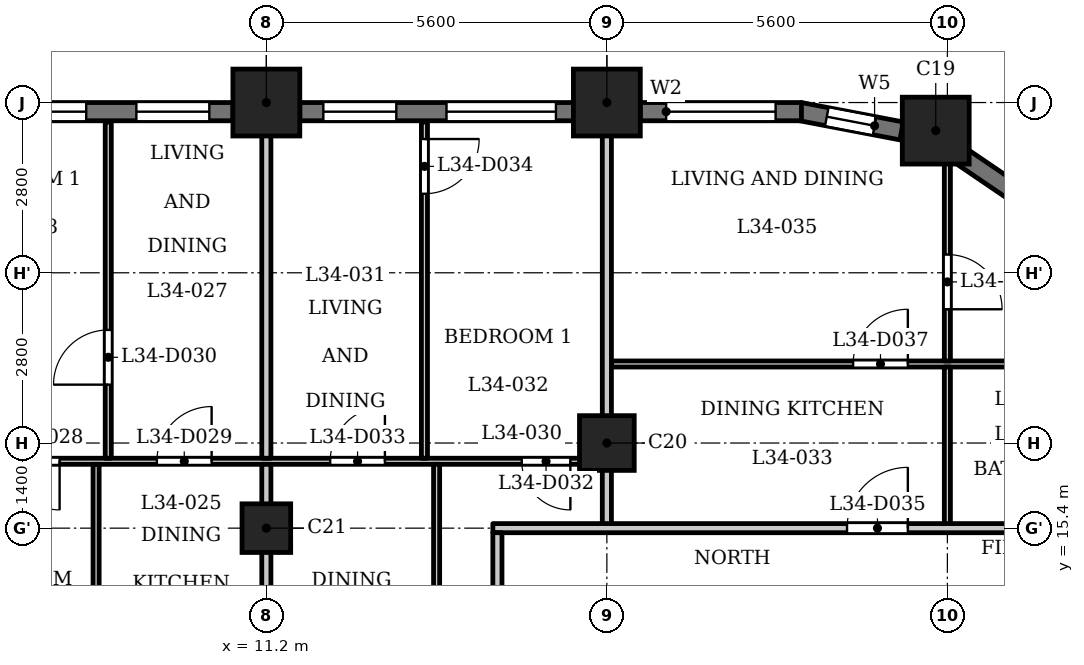
"""IFC4 building model, lengths in metres.
Left out: names, types, materials, properties, quantities, classifications, styles, units other than length and angle.
Written with IfcOpenShell. Run it as: python <this file> out.ifc"""

import sys

from ifc_helpers import new_model, si_unit, direction, frame, frame_2d, origin, origin_2d, place, context, subcontext, project, spatial, rectangle, extrude, element, fill, save


model = new_model("IFC4")
c1 = context("Model", 3, precision=1e-05, world=origin(), true_north=direction((0.0, 1.0)))
c2 = subcontext(c1, "Body", "Model", "MODEL_VIEW")
j1 = project(units=[si_unit("LENGTHUNIT", "METRE"), si_unit("PLANEANGLEUNIT", "RADIAN")], contexts=[c1])
p1 = place(None, origin())
s1 = spatial("IfcSite", under=j1, at=p1, CompositionType="ELEMENT")
p2 = place(p1, origin())
s2 = spatial("IfcBuilding", under=s1, at=p2, CompositionType="ELEMENT")
p3 = place(p2, frame((0.0, 0.0, 136.1)))
s3 = spatial("IfcBuildingStorey", under=s2, at=p3, CompositionType="ELEMENT", Elevation=136.1)
for number, where, z_axis, x_axis in (
    (1, (22.209, 21.938, 0.0), (0.0, 0.0, 1.0), (1.0, 0.0, 0.0)),
    (2, (16.8, 22.4, 0.0), (0.0, 0.0, 1.0), (1.0, 0.0, 0.0)),
    (3, (11.2, 22.4, 0.0), (0.0, 0.0, 1.0), (1.0, 0.0, 0.0)),
):
    element("IfcColumn", number, at=place(p3, frame(where, z_axis=z_axis, x_axis=x_axis)), inside=s3, PredefinedType="COLUMN", context=c2, shape_type="SweptSolid", body=[
        extrude(rectangle(XDim=1.1, YDim=1.1, at=origin_2d()), origin(), (0.0, 0.0, 1.0), 3.5),
    ])
p4 = place(p3, frame((16.8, 16.8, 0.0), z_axis=(0.0, 0.0, 1.0), x_axis=(1.0, 0.0, 0.0)))
e4 = element("IfcColumn", 4, at=p4, inside=s3, PredefinedType="COLUMN", context=c2, shape_type="SweptSolid", body=[
    extrude(rectangle(XDim=0.9, YDim=0.9, at=origin_2d()), origin(), (0.0, 0.0, 1.0), 3.5),
])
p5 = place(p3, frame((11.2, 15.4, 0.0), z_axis=(0.0, 0.0, 1.0), x_axis=(1.0, 0.0, 0.0)))
e5 = element("IfcColumn", 5, at=p5, inside=s3, PredefinedType="COLUMN", context=c2, shape_type="SweptSolid", body=[
    extrude(rectangle(XDim=0.8, YDim=0.8, at=origin_2d()), origin(), (0.0, 0.0, 1.0), 3.5),
])
p6 = place(p3, frame((23.492, 20.932, 0.0), z_axis=(0.0, 0.0, 1.0), x_axis=(-0.826993959827, 0.562210806023, 0.0)))
e6 = element("IfcWall", 6, at=p6, inside=s3, PredefinedType="SOLIDWALL", context=c2, shape_type="SweptSolid", body=[
    extrude(rectangle(XDim=1.077, YDim=0.3, at=frame_2d((0.539, 0.0))), origin(), (0.0, 0.0, 1.0), 3.2),
])
p7 = place(p3, frame((21.648, 21.933, 0.0), z_axis=(0.0, 0.0, 1.0), x_axis=(-0.982297206936, 0.187329114784, 0.0)))
e7 = element("IfcWall", 7, at=p7, inside=s3, PredefinedType="SOLIDWALL", context=c2, shape_type="SweptSolid", body=[
    extrude(rectangle(XDim=1.706, YDim=0.3, at=frame_2d((0.853, 0.0))), origin(), (0.0, 0.0, 1.0), 2.45),
])
p8 = place(p7, frame((0.453, 0.0, 0.6)))
e8 = element("IfcOpeningElement", 8, at=p8, cuts=e7, PredefinedType="OPENING", context=c2, shape_type="SweptSolid", body=[
    extrude(rectangle(XDim=0.8, YDim=1.55, at=frame_2d((0.4, 0.775))), frame((0.0, 0.16, 0.0), z_axis=(0.0, -1.0, 0.0), x_axis=(1.0, 0.0, 0.0)), (0.0, 0.0, 1.0), 0.32),
])
p9 = place(p3, frame((20.0, 22.25, 0.0), z_axis=(0.0, 0.0, 1.0), x_axis=(-1.0, 0.0, 0.0)))
e9 = element("IfcWall", 9, at=p9, inside=s3, PredefinedType="SOLIDWALL", context=c2, shape_type="SweptSolid", body=[
    extrude(rectangle(XDim=2.65, YDim=0.3, at=frame_2d((1.325, 0.0))), origin(), (0.0, 0.0, 1.0), 2.45),
])
p10 = place(p9, frame((0.425, 0.0, 0.9)))
e10 = element("IfcOpeningElement", 10, at=p10, cuts=e9, PredefinedType="OPENING", context=c2, shape_type="SweptSolid", body=[
    extrude(rectangle(XDim=1.8, YDim=1.25, at=frame_2d((0.9, 0.625))), frame((0.0, 0.16, 0.0), z_axis=(0.0, -1.0, 0.0), x_axis=(1.0, 0.0, 0.0)), (0.0, 0.0, 1.0), 0.32),
])
p11 = place(p3, frame((16.25, 22.25, 0.0), z_axis=(0.0, 0.0, 1.0), x_axis=(-1.0, 0.0, 0.0)))
e11 = element("IfcWall", 11, at=p11, inside=s3, PredefinedType="SOLIDWALL", context=c2, shape_type="SweptSolid", body=[
    extrude(rectangle(XDim=4.5, YDim=0.3, at=frame_2d((2.25, 0.0))), origin(), (0.0, 0.0, 1.0), 2.45),
])
p12 = place(p11, frame((0.288, 0.0, 0.9)))
e12 = element("IfcOpeningElement", 12, at=p12, cuts=e11, PredefinedType="OPENING", context=c2, shape_type="SweptSolid", body=[
    extrude(rectangle(XDim=1.8, YDim=1.25, at=frame_2d((0.9, 0.625))), frame((0.0, 0.16, 0.0), z_axis=(0.0, -1.0, 0.0), x_axis=(1.0, 0.0, 0.0)), (0.0, 0.0, 1.0), 0.32),
])
p13 = place(p11, frame((2.913, 0.0, 0.6)))
e13 = element("IfcOpeningElement", 13, at=p13, cuts=e11, PredefinedType="OPENING", context=c2, shape_type="SweptSolid", body=[
    extrude(rectangle(XDim=1.2, YDim=1.55, at=frame_2d((0.6, 0.775))), frame((0.0, 0.16, 0.0), z_axis=(0.0, -1.0, 0.0), x_axis=(1.0, 0.0, 0.0)), (0.0, 0.0, 1.0), 0.32),
])
p14 = place(p3, frame((10.65, 22.25, 0.0), z_axis=(0.0, 0.0, 1.0), x_axis=(-1.0, 0.0, 0.0)))
e14 = element("IfcWall", 14, at=p14, inside=s3, PredefinedType="SOLIDWALL", context=c2, shape_type="SweptSolid", body=[
    extrude(rectangle(XDim=4.5, YDim=0.3, at=frame_2d((2.25, 0.0))), origin(), (0.0, 0.0, 1.0), 2.45),
])
p15 = place(p14, frame((0.387, 0.0, 0.6)))
e15 = element("IfcOpeningElement", 15, at=p15, cuts=e14, PredefinedType="OPENING", context=c2, shape_type="SweptSolid", body=[
    extrude(rectangle(XDim=1.2, YDim=1.55, at=frame_2d((0.6, 0.775))), frame((0.0, 0.16, 0.0), z_axis=(0.0, -1.0, 0.0), x_axis=(1.0, 0.0, 0.0)), (0.0, 0.0, 1.0), 0.32),
])
p16 = place(p14, frame((2.413, 0.0, 0.9)))
e16 = element("IfcOpeningElement", 16, at=p16, cuts=e14, PredefinedType="OPENING", context=c2, shape_type="SweptSolid", body=[
    extrude(rectangle(XDim=1.8, YDim=1.25, at=frame_2d((0.9, 0.625))), frame((0.0, 0.16, 0.0), z_axis=(0.0, -1.0, 0.0), x_axis=(1.0, 0.0, 0.0)), (0.0, 0.0, 1.0), 0.32),
])
p17 = place(p3, frame((14.925, 15.4, 0.0), z_axis=(0.0, 0.0, 1.0), x_axis=(1.0, 0.0, 0.0)))
e17 = element("IfcWall", 17, at=p17, inside=s3, PredefinedType="PARTITIONING", context=c2, shape_type="SweptSolid", body=[
    extrude(rectangle(XDim=12.559, YDim=0.15, at=frame_2d((6.279, 0.0))), origin(), (0.0, 0.0, 1.0), 3.2),
])
p18 = place(p17, frame((5.825, 0.0, 0.0)))
e18 = element("IfcOpeningElement", 18, at=p18, cuts=e17, PredefinedType="OPENING", context=c2, shape_type="SweptSolid", body=[
    extrude(rectangle(XDim=1.0, YDim=2.1, at=frame_2d((0.5, 1.05))), frame((0.0, 0.085, 0.0), z_axis=(0.0, -1.0, 0.0), x_axis=(1.0, 0.0, 0.0)), (0.0, 0.0, 1.0), 0.17),
])
p19 = place(p3, frame((-16.725, 16.5, 0.0), z_axis=(0.0, 0.0, 1.0), x_axis=(1.0, 0.0, 0.0)))
e19 = element("IfcWall", 19, at=p19, inside=s3, PredefinedType="PARTITIONING", context=c2, shape_type="SweptSolid", body=[
    extrude(rectangle(XDim=33.45, YDim=0.1, at=frame_2d((16.725, 0.0))), origin(), (0.0, 0.0, 1.0), 3.2),
])
p20 = place(p19, frame((9.675, 0.0, 0.0)))
e20 = element("IfcOpeningElement", 20, at=p20, cuts=e19, PredefinedType="OPENING", context=c2, shape_type="SweptSolid", body=[
    extrude(rectangle(XDim=0.8, YDim=2.1, at=frame_2d((0.4, 1.05))), frame((0.0, 0.06, 0.0), z_axis=(0.0, -1.0, 0.0), x_axis=(1.0, 0.0, 0.0)), (0.0, 0.0, 1.0), 0.12),
])
p21 = place(p19, frame((3.975, 0.0, 0.0)))
e21 = element("IfcOpeningElement", 21, at=p21, cuts=e19, PredefinedType="OPENING", context=c2, shape_type="SweptSolid", body=[
    extrude(rectangle(XDim=0.9, YDim=2.1, at=frame_2d((0.45, 1.05))), frame((0.0, 0.06, 0.0), z_axis=(0.0, -1.0, 0.0), x_axis=(1.0, 0.0, 0.0)), (0.0, 0.0, 1.0), 0.12),
])
p22 = place(p19, frame((12.025, 0.0, 0.0)))
e22 = element("IfcOpeningElement", 22, at=p22, cuts=e19, PredefinedType="OPENING", context=c2, shape_type="SweptSolid", body=[
    extrude(rectangle(XDim=0.8, YDim=2.1, at=frame_2d((0.4, 1.05))), frame((0.0, 0.06, 0.0), z_axis=(0.0, -1.0, 0.0), x_axis=(1.0, 0.0, 0.0)), (0.0, 0.0, 1.0), 0.12),
])
p23 = place(p19, frame((15.175, 0.0, 0.0)))
e23 = element("IfcOpeningElement", 23, at=p23, cuts=e19, PredefinedType="OPENING", context=c2, shape_type="SweptSolid", body=[
    extrude(rectangle(XDim=0.9, YDim=2.1, at=frame_2d((0.45, 1.05))), frame((0.0, 0.06, 0.0), z_axis=(0.0, -1.0, 0.0), x_axis=(1.0, 0.0, 0.0)), (0.0, 0.0, 1.0), 0.12),
])
p24 = place(p19, frame((20.975, 0.0, 0.0)))
e24 = element("IfcOpeningElement", 24, at=p24, cuts=e19, PredefinedType="OPENING", context=c2, shape_type="SweptSolid", body=[
    extrude(rectangle(XDim=0.8, YDim=2.1, at=frame_2d((0.4, 1.05))), frame((0.0, 0.06, 0.0), z_axis=(0.0, -1.0, 0.0), x_axis=(1.0, 0.0, 0.0)), (0.0, 0.0, 1.0), 0.12),
])
p25 = place(p19, frame((18.175, 0.0, 0.0)))
e25 = element("IfcOpeningElement", 25, at=p25, cuts=e19, PredefinedType="OPENING", context=c2, shape_type="SweptSolid", body=[
    extrude(rectangle(XDim=0.9, YDim=2.1, at=frame_2d((0.45, 1.05))), frame((0.0, 0.06, 0.0), z_axis=(0.0, -1.0, 0.0), x_axis=(1.0, 0.0, 0.0)), (0.0, 0.0, 1.0), 0.12),
])
p26 = place(p19, frame((23.725, 0.0, 0.0)))
e26 = element("IfcOpeningElement", 26, at=p26, cuts=e19, PredefinedType="OPENING", context=c2, shape_type="SweptSolid", body=[
    extrude(rectangle(XDim=0.8, YDim=2.1, at=frame_2d((0.4, 1.05))), frame((0.0, 0.06, 0.0), z_axis=(0.0, -1.0, 0.0), x_axis=(1.0, 0.0, 0.0)), (0.0, 0.0, 1.0), 0.12),
])
p27 = place(p19, frame((26.125, 0.0, 0.0)))
e27 = element("IfcOpeningElement", 27, at=p27, cuts=e19, PredefinedType="OPENING", context=c2, shape_type="SweptSolid", body=[
    extrude(rectangle(XDim=0.9, YDim=2.1, at=frame_2d((0.45, 1.05))), frame((0.0, 0.06, 0.0), z_axis=(0.0, -1.0, 0.0), x_axis=(1.0, 0.0, 0.0)), (0.0, 0.0, 1.0), 0.12),
])
p28 = place(p19, frame((32.125, 0.0, 0.0)))
e28 = element("IfcOpeningElement", 28, at=p28, cuts=e19, PredefinedType="OPENING", context=c2, shape_type="SweptSolid", body=[
    extrude(rectangle(XDim=0.8, YDim=2.1, at=frame_2d((0.4, 1.05))), frame((0.0, 0.06, 0.0), z_axis=(0.0, -1.0, 0.0), x_axis=(1.0, 0.0, 0.0)), (0.0, 0.0, 1.0), 0.12),
])
p29 = place(p19, frame((28.975, 0.0, 0.0)))
e29 = element("IfcOpeningElement", 29, at=p29, cuts=e19, PredefinedType="OPENING", context=c2, shape_type="SweptSolid", body=[
    extrude(rectangle(XDim=0.9, YDim=2.1, at=frame_2d((0.45, 1.05))), frame((0.0, 0.06, 0.0), z_axis=(0.0, -1.0, 0.0), x_axis=(1.0, 0.0, 0.0)), (0.0, 0.0, 1.0), 0.12),
])
p30 = place(p3, frame((16.875, 18.1, 0.0), z_axis=(0.0, 0.0, 1.0), x_axis=(1.0, 0.0, 0.0)))
e30 = element("IfcWall", 30, at=p30, inside=s3, PredefinedType="PARTITIONING", context=c2, shape_type="SweptSolid", body=[
    extrude(rectangle(XDim=9.315, YDim=0.1, at=frame_2d((4.658, 0.0))), origin(), (0.0, 0.0, 1.0), 3.2),
])
p31 = place(p30, frame((7.425, 0.0, 0.0)))
e31 = element("IfcOpeningElement", 31, at=p31, cuts=e30, PredefinedType="OPENING", context=c2, shape_type="SweptSolid", body=[
    extrude(rectangle(XDim=0.8, YDim=2.1, at=frame_2d((0.4, 1.05))), frame((0.0, 0.06, 0.0), z_axis=(0.0, -1.0, 0.0), x_axis=(1.0, 0.0, 0.0)), (0.0, 0.0, 1.0), 0.12),
])
p32 = place(p30, frame((3.975, 0.0, 0.0)))
e32 = element("IfcOpeningElement", 32, at=p32, cuts=e30, PredefinedType="OPENING", context=c2, shape_type="SweptSolid", body=[
    extrude(rectangle(XDim=0.9, YDim=2.1, at=frame_2d((0.45, 1.05))), frame((0.0, 0.06, 0.0), z_axis=(0.0, -1.0, 0.0), x_axis=(1.0, 0.0, 0.0)), (0.0, 0.0, 1.0), 0.12),
])
p33 = place(p3, frame((8.4, 13.275, 0.0), z_axis=(0.0, 0.0, 1.0), x_axis=(0.0, 1.0, 0.0)))
e33 = element("IfcWall", 33, at=p33, inside=s3, PredefinedType="PARTITIONING", context=c2, shape_type="SweptSolid", body=[
    extrude(rectangle(XDim=3.175, YDim=0.1, at=frame_2d((1.587, 0.0))), origin(), (0.0, 0.0, 1.0), 3.2),
])
p34 = place(p3, frame((8.6, 16.55, 0.0), z_axis=(0.0, 0.0, 1.0), x_axis=(0.0, 1.0, 0.0)))
e34 = element("IfcWall", 34, at=p34, inside=s3, PredefinedType="PARTITIONING", context=c2, shape_type="SweptSolid", body=[
    extrude(rectangle(XDim=5.53, YDim=0.1, at=frame_2d((2.765, 0.0))), origin(), (0.0, 0.0, 1.0), 3.2),
])
p35 = place(p34, frame((1.21, 0.0, 0.0)))
e35 = element("IfcOpeningElement", 35, at=p35, cuts=e34, PredefinedType="OPENING", context=c2, shape_type="SweptSolid", body=[
    extrude(rectangle(XDim=0.9, YDim=2.1, at=frame_2d((0.45, 1.05))), frame((0.0, 0.06, 0.0), z_axis=(0.0, -1.0, 0.0), x_axis=(1.0, 0.0, 0.0)), (0.0, 0.0, 1.0), 0.12),
])
p36 = place(p3, frame((11.2, 13.275, 0.0), z_axis=(0.0, 0.0, 1.0), x_axis=(0.0, 1.0, 0.0)))
e36 = element("IfcWall", 36, at=p36, inside=s3, PredefinedType="PARTITIONING", context=c2, shape_type="SweptSolid", body=[
    extrude(rectangle(XDim=3.175, YDim=0.15, at=frame_2d((1.587, 0.0))), origin(), (0.0, 0.0, 1.0), 3.2),
])
p37 = place(p3, frame((11.2, 16.55, 0.0), z_axis=(0.0, 0.0, 1.0), x_axis=(0.0, 1.0, 0.0)))
e37 = element("IfcWall", 37, at=p37, inside=s3, PredefinedType="PARTITIONING", context=c2, shape_type="SweptSolid", body=[
    extrude(rectangle(XDim=6.38, YDim=0.15, at=frame_2d((3.19, 0.0))), origin(), (0.0, 0.0, 1.0), 3.2),
])
p38 = place(p3, frame((13.8, 16.55, 0.0), z_axis=(0.0, 0.0, 1.0), x_axis=(0.0, 1.0, 0.0)))
e38 = element("IfcWall", 38, at=p38, inside=s3, PredefinedType="PARTITIONING", context=c2, shape_type="SweptSolid", body=[
    extrude(rectangle(XDim=5.53, YDim=0.1, at=frame_2d((2.765, 0.0))), origin(), (0.0, 0.0, 1.0), 3.2),
])
p39 = place(p38, frame((4.35, 0.0, 0.0)))
e39 = element("IfcOpeningElement", 39, at=p39, cuts=e38, PredefinedType="OPENING", context=c2, shape_type="SweptSolid", body=[
    extrude(rectangle(XDim=0.9, YDim=2.1, at=frame_2d((0.45, 1.05))), frame((0.0, 0.06, 0.0), z_axis=(0.0, -1.0, 0.0), x_axis=(1.0, 0.0, 0.0)), (0.0, 0.0, 1.0), 0.12),
])
p40 = place(p3, frame((14.0, 13.275, 0.0), z_axis=(0.0, 0.0, 1.0), x_axis=(0.0, 1.0, 0.0)))
e40 = element("IfcWall", 40, at=p40, inside=s3, PredefinedType="PARTITIONING", context=c2, shape_type="SweptSolid", body=[
    extrude(rectangle(XDim=3.175, YDim=0.1, at=frame_2d((1.587, 0.0))), origin(), (0.0, 0.0, 1.0), 3.2),
])
p41 = place(p3, frame((15.0, 13.275, 0.0), z_axis=(0.0, 0.0, 1.0), x_axis=(0.0, 1.0, 0.0)))
e41 = element("IfcWall", 41, at=p41, inside=s3, PredefinedType="PARTITIONING", context=c2, shape_type="SweptSolid", body=[
    extrude(rectangle(XDim=2.05, YDim=0.15, at=frame_2d((1.025, 0.0))), origin(), (0.0, 0.0, 1.0), 3.2),
])
p42 = place(p3, frame((16.8, 15.475, 0.0), z_axis=(0.0, 0.0, 1.0), x_axis=(0.0, 1.0, 0.0)))
e42 = element("IfcWall", 42, at=p42, inside=s3, PredefinedType="PARTITIONING", context=c2, shape_type="SweptSolid", body=[
    extrude(rectangle(XDim=7.455, YDim=0.15, at=frame_2d((3.728, 0.0))), origin(), (0.0, 0.0, 1.0), 3.2),
])
p43 = place(p3, frame((22.4, 15.475, 0.0), z_axis=(0.0, 0.0, 1.0), x_axis=(0.0, 1.0, 0.0)))
e43 = element("IfcWall", 43, at=p43, inside=s3, PredefinedType="PARTITIONING", context=c2, shape_type="SweptSolid", body=[
    extrude(rectangle(XDim=2.575, YDim=0.1, at=frame_2d((1.288, 0.0))), origin(), (0.0, 0.0, 1.0), 3.2),
])
p44 = place(p3, frame((22.4, 18.15, 0.0), z_axis=(0.0, 0.0, 1.0), x_axis=(0.0, 1.0, 0.0)))
e44 = element("IfcWall", 44, at=p44, inside=s3, PredefinedType="PARTITIONING", context=c2, shape_type="SweptSolid", body=[
    extrude(rectangle(XDim=3.57, YDim=0.1, at=frame_2d((1.785, 0.0))), origin(), (0.0, 0.0, 1.0), 3.2),
])
p45 = place(p44, frame((0.85, 0.0, 0.0)))
e45 = element("IfcOpeningElement", 45, at=p45, cuts=e44, PredefinedType="OPENING", context=c2, shape_type="SweptSolid", body=[
    extrude(rectangle(XDim=0.9, YDim=2.1, at=frame_2d((0.45, 1.05))), frame((0.0, 0.06, 0.0), z_axis=(0.0, -1.0, 0.0), x_axis=(1.0, 0.0, 0.0)), (0.0, 0.0, 1.0), 0.12),
])
p46 = place(p26, origin())
e46 = element("IfcDoor", 46, at=p46, inside=s3, OperationType="SINGLE_SWING_RIGHT", PredefinedType="DOOR", context=c2, shape_type="SweptSolid", body=[
    extrude(rectangle(XDim=0.8, YDim=2.1, at=frame_2d((0.4, 1.05))), frame((0.0, 0.025, 0.0), z_axis=(0.0, -1.0, 0.0), x_axis=(1.0, 0.0, 0.0)), (0.0, 0.0, 1.0), 0.05),
])
fill(e26, e46)
p47 = place(p27, origin())
e47 = element("IfcDoor", 47, at=p47, inside=s3, OperationType="SINGLE_SWING_LEFT", PredefinedType="DOOR", context=c2, shape_type="SweptSolid", body=[
    extrude(rectangle(XDim=0.9, YDim=2.1, at=frame_2d((0.45, 1.05))), frame((0.0, 0.025, 0.0), z_axis=(0.0, -1.0, 0.0), x_axis=(1.0, 0.0, 0.0)), (0.0, 0.0, 1.0), 0.05),
])
fill(e27, e47)
p48 = place(p35, origin())
e48 = element("IfcDoor", 48, at=p48, inside=s3, OperationType="SINGLE_SWING_RIGHT", PredefinedType="DOOR", context=c2, shape_type="SweptSolid", body=[
    extrude(rectangle(XDim=0.9, YDim=2.1, at=frame_2d((0.45, 1.05))), frame((0.0, 0.025, 0.0), z_axis=(0.0, -1.0, 0.0), x_axis=(1.0, 0.0, 0.0)), (0.0, 0.0, 1.0), 0.05),
])
fill(e35, e48)
p49 = place(p28, origin())
e49 = element("IfcDoor", 49, at=p49, inside=s3, OperationType="SINGLE_SWING_RIGHT", PredefinedType="DOOR", context=c2, shape_type="SweptSolid", body=[
    extrude(rectangle(XDim=0.8, YDim=2.1, at=frame_2d((0.4, 1.05))), frame((0.0, 0.025, 0.0), z_axis=(0.0, -1.0, 0.0), x_axis=(1.0, 0.0, 0.0)), (0.0, 0.0, 1.0), 0.05),
])
fill(e28, e49)
p50 = place(p29, origin())
e50 = element("IfcDoor", 50, at=p50, inside=s3, OperationType="SINGLE_SWING_LEFT", PredefinedType="DOOR", context=c2, shape_type="SweptSolid", body=[
    extrude(rectangle(XDim=0.9, YDim=2.1, at=frame_2d((0.45, 1.05))), frame((0.0, 0.025, 0.0), z_axis=(0.0, -1.0, 0.0), x_axis=(1.0, 0.0, 0.0)), (0.0, 0.0, 1.0), 0.05),
])
fill(e29, e50)
p51 = place(p39, origin())
e51 = element("IfcDoor", 51, at=p51, inside=s3, OperationType="SINGLE_SWING_RIGHT", PredefinedType="DOOR", context=c2, shape_type="SweptSolid", body=[
    extrude(rectangle(XDim=0.9, YDim=2.1, at=frame_2d((0.45, 1.05))), frame((0.0, 0.025, 0.0), z_axis=(0.0, -1.0, 0.0), x_axis=(1.0, 0.0, 0.0)), (0.0, 0.0, 1.0), 0.05),
])
fill(e39, e51)
p52 = place(p18, origin())
e52 = element("IfcDoor", 52, at=p52, inside=s3, OperationType="SINGLE_SWING_LEFT", PredefinedType="DOOR", context=c2, shape_type="SweptSolid", body=[
    extrude(rectangle(XDim=1.0, YDim=2.1, at=frame_2d((0.5, 1.05))), frame((0.0, 0.025, 0.0), z_axis=(0.0, -1.0, 0.0), x_axis=(1.0, 0.0, 0.0)), (0.0, 0.0, 1.0), 0.05),
])
fill(e18, e52)
p53 = place(p32, origin())
e53 = element("IfcDoor", 53, at=p53, inside=s3, OperationType="SINGLE_SWING_LEFT", PredefinedType="DOOR", context=c2, shape_type="SweptSolid", body=[
    extrude(rectangle(XDim=0.9, YDim=2.1, at=frame_2d((0.45, 1.05))), frame((0.0, 0.025, 0.0), z_axis=(0.0, -1.0, 0.0), x_axis=(1.0, 0.0, 0.0)), (0.0, 0.0, 1.0), 0.05),
])
fill(e32, e53)
p54 = place(p45, origin())
e54 = element("IfcDoor", 54, at=p54, inside=s3, OperationType="SINGLE_SWING_LEFT", PredefinedType="DOOR", context=c2, shape_type="SweptSolid", body=[
    extrude(rectangle(XDim=0.9, YDim=2.1, at=frame_2d((0.45, 1.05))), frame((0.0, 0.025, 0.0), z_axis=(0.0, -1.0, 0.0), x_axis=(1.0, 0.0, 0.0)), (0.0, 0.0, 1.0), 0.05),
])
fill(e45, e54)
p55 = place(p8, origin())
e55 = element("IfcWindow", 55, at=p55, inside=s3, PartitioningType="SINGLE_PANEL", PredefinedType="WINDOW", context=c2, shape_type="SweptSolid", body=[
    extrude(rectangle(XDim=0.8, YDim=1.55, at=frame_2d((0.4, 0.775))), frame((0.0, 0.03, 0.0), z_axis=(0.0, -1.0, 0.0), x_axis=(1.0, 0.0, 0.0)), (0.0, 0.0, 1.0), 0.06),
])
fill(e8, e55)
p56 = place(p10, origin())
e56 = element("IfcWindow", 56, at=p56, inside=s3, PartitioningType="SINGLE_PANEL", PredefinedType="WINDOW", context=c2, shape_type="SweptSolid", body=[
    extrude(rectangle(XDim=1.8, YDim=1.25, at=frame_2d((0.9, 0.625))), frame((0.0, 0.03, 0.0), z_axis=(0.0, -1.0, 0.0), x_axis=(1.0, 0.0, 0.0)), (0.0, 0.0, 1.0), 0.06),
])
fill(e10, e56)
p57 = place(p12, origin())
e57 = element("IfcWindow", 57, at=p57, inside=s3, PartitioningType="SINGLE_PANEL", PredefinedType="WINDOW", context=c2, shape_type="SweptSolid", body=[
    extrude(rectangle(XDim=1.8, YDim=1.25, at=frame_2d((0.9, 0.625))), frame((0.0, 0.03, 0.0), z_axis=(0.0, -1.0, 0.0), x_axis=(1.0, 0.0, 0.0)), (0.0, 0.0, 1.0), 0.06),
])
fill(e12, e57)
p58 = place(p13, origin())
e58 = element("IfcWindow", 58, at=p58, inside=s3, PartitioningType="SINGLE_PANEL", PredefinedType="WINDOW", context=c2, shape_type="SweptSolid", body=[
    extrude(rectangle(XDim=1.2, YDim=1.55, at=frame_2d((0.6, 0.775))), frame((0.0, 0.03, 0.0), z_axis=(0.0, -1.0, 0.0), x_axis=(1.0, 0.0, 0.0)), (0.0, 0.0, 1.0), 0.06),
])
fill(e13, e58)
p59 = place(p15, origin())
e59 = element("IfcWindow", 59, at=p59, inside=s3, PartitioningType="SINGLE_PANEL", PredefinedType="WINDOW", context=c2, shape_type="SweptSolid", body=[
    extrude(rectangle(XDim=1.2, YDim=1.55, at=frame_2d((0.6, 0.775))), frame((0.0, 0.03, 0.0), z_axis=(0.0, -1.0, 0.0), x_axis=(1.0, 0.0, 0.0)), (0.0, 0.0, 1.0), 0.06),
])
fill(e15, e59)
p60 = place(p16, origin())
e60 = element("IfcWindow", 60, at=p60, inside=s3, PartitioningType="SINGLE_PANEL", PredefinedType="WINDOW", context=c2, shape_type="SweptSolid", body=[
    extrude(rectangle(XDim=1.8, YDim=1.25, at=frame_2d((0.9, 0.625))), frame((0.0, 0.03, 0.0), z_axis=(0.0, -1.0, 0.0), x_axis=(1.0, 0.0, 0.0)), (0.0, 0.0, 1.0), 0.06),
])
fill(e16, e60)
save(model, sys.argv[1])
